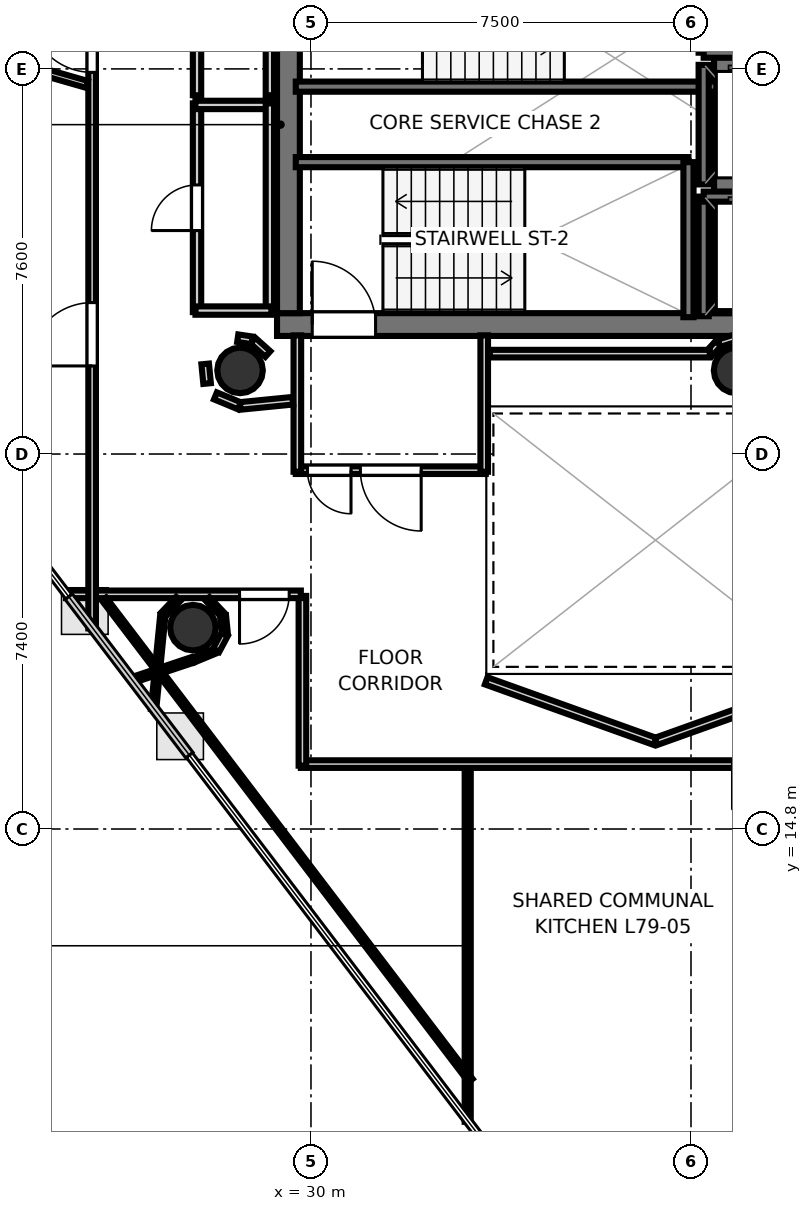
"""IFC4 building model, lengths in metres.
Left out: names, types, materials, properties, quantities, classifications, styles, units other than length and angle.
Written with IfcOpenShell. Run it as: python <this file> out.ifc"""

import sys

from ifc_helpers import new_model, si_unit, direction, frame, frame_2d, origin, origin_2d, place, context, subcontext, project, spatial, rectangle, hollow_circle, extrude, element, fill, save


model = new_model("IFC4")
c1 = context("Model", 3, precision=1e-05, world=origin(), true_north=direction((0.0, 1.0)))
c2 = subcontext(c1, "Body", "Model", "MODEL_VIEW")
j1 = project(units=[si_unit("LENGTHUNIT", "METRE"), si_unit("PLANEANGLEUNIT", "RADIAN")], contexts=[c1])
p1 = place(None, origin())
s1 = spatial("IfcSite", under=j1, at=p1, CompositionType="ELEMENT")
p2 = place(p1, origin())
s2 = spatial("IfcBuilding", under=s1, at=p2, CompositionType="ELEMENT")
p3 = place(p2, frame((0.0, 0.0, 306.5)))
s3 = spatial("IfcBuildingStorey", under=s2, at=p3, CompositionType="ELEMENT", Elevation=306.5)
p4 = place(p3, frame((29.33, 24.755, 0.0), z_axis=(0.0, 0.0, 1.0), x_axis=(1.0, 0.0, 0.0)))
e1 = element("IfcWall", 1, at=p4, inside=s3, PredefinedType="SHEAR", context=c2, shape_type="SweptSolid", body=[
    extrude(rectangle(XDim=10.52, YDim=0.45, at=frame_2d((5.26, 0.0))), origin(), (0.0, 0.0, 1.0), 3.52),
])
p5 = place(p4, frame((0.695, 0.0, 0.0)))
e2 = element("IfcOpeningElement", 2, at=p5, cuts=e1, PredefinedType="OPENING", context=c2, shape_type="SweptSolid", body=[
    extrude(rectangle(XDim=1.25, YDim=2.15, at=frame_2d((0.625, 1.075))), frame((0.0, 0.235, 0.0), z_axis=(0.0, -1.0, 0.0), x_axis=(1.0, 0.0, 0.0)), (0.0, 0.0, 1.0), 0.47),
])
for number, where, z_axis, x_axis in (
    (3, (29.555, 24.98, 0.0), (0.0, 0.0, 1.0), (0.0, 1.0, 0.0)),
    (4, (38.18, 24.98, 0.0), (0.0, 0.0, 1.0), (0.0, 1.0, 0.0)),
):
    element("IfcWall", number, at=place(p3, frame(where, z_axis=z_axis, x_axis=x_axis)), inside=s3, PredefinedType="SHEAR", context=c2, shape_type="SweptSolid", body=[
        extrude(rectangle(XDim=7.44, YDim=0.45, at=frame_2d((3.72, 0.0))), origin(), (0.0, 0.0, 1.0), 3.52),
    ])
for number, where, z_axis, x_axis in (
    (5, (28.6, 23.85, 0.0), (0.0, 0.0, 1.0), (1.0, 0.0, 0.0)),
    (6, (38.4, 23.85, 0.0), (0.0, 0.0, 1.0), (1.0, 0.0, 0.0)),
    (7, (27.67, 18.774, 0.0), (0.0, 0.0, 1.0), (1.0, 0.0, 0.0)),
):
    element("IfcColumn", number, at=place(p3, frame(where, z_axis=z_axis, x_axis=x_axis)), inside=s3, PredefinedType="COLUMN", context=c2, shape_type="SweptSolid", body=[
        extrude(hollow_circle(Radius=0.45, WallThickness=0.025, at=origin_2d()), origin(), (0.0, 0.0, 1.0), 3.7),
    ])
p6 = place(p3, frame((29.7, 29.45, 0.0), z_axis=(0.0, 0.0, 1.0), x_axis=(1.0, 0.0, 0.0)))
e8 = element("IfcWall", 8, at=p6, inside=s3, PredefinedType="SOLIDWALL", context=c2, shape_type="SweptSolid", body=[
    extrude(rectangle(XDim=8.3, YDim=0.2, at=frame_2d((4.15, 0.0))), origin(), (0.0, 0.0, 1.0), 3.52),
])
p7 = place(p3, frame((29.7, 27.96, 0.0), z_axis=(0.0, 0.0, 1.0), x_axis=(1.0, 0.0, 0.0)))
e9 = element("IfcWall", 9, at=p7, inside=s3, PredefinedType="SOLIDWALL", context=c2, shape_type="SweptSolid", body=[
    extrude(rectangle(XDim=7.75, YDim=0.2, at=frame_2d((3.875, 0.0))), origin(), (0.0, 0.0, 1.0), 3.52),
])
p8 = place(p3, frame((37.45, 24.9, 0.0), z_axis=(0.0, 0.0, 1.0), x_axis=(0.0, 1.0, 0.0)))
e10 = element("IfcWall", 10, at=p8, inside=s3, PredefinedType="SOLIDWALL", context=c2, shape_type="SweptSolid", body=[
    extrude(rectangle(XDim=3.06, YDim=0.2, at=frame_2d((1.53, 0.0))), origin(), (0.0, 0.0, 1.0), 3.52),
])
p9 = place(p3, frame((37.75, 30.12, 0.0), z_axis=(0.0, 0.0, 1.0), x_axis=(1.0, 0.0, 0.0)))
e11 = element("IfcWall", 11, at=p9, inside=s3, PredefinedType="SOLIDWALL", context=c2, shape_type="SweptSolid", body=[
    extrude(rectangle(XDim=2.1, YDim=0.2, at=frame_2d((1.05, 0.0))), origin(), (0.0, 0.0, 1.0), 3.52),
])
p10 = place(p3, frame((37.75, 24.92, 0.0), z_axis=(0.0, 0.0, 1.0), x_axis=(0.0, 1.0, 0.0)))
e12 = element("IfcWall", 12, at=p10, inside=s3, PredefinedType="SOLIDWALL", context=c2, shape_type="SweptSolid", body=[
    extrude(rectangle(XDim=2.36, YDim=0.2, at=frame_2d((1.18, 0.0))), origin(), (0.0, 0.0, 1.0), 3.52),
])
p11 = place(p3, frame((37.75, 27.28, 0.0), z_axis=(0.0, 0.0, 1.0), x_axis=(1.0, 0.0, 0.0)))
e13 = element("IfcWall", 13, at=p11, inside=s3, PredefinedType="SOLIDWALL", context=c2, shape_type="SweptSolid", body=[
    extrude(rectangle(XDim=2.1, YDim=0.2, at=frame_2d((1.05, 0.0))), origin(), (0.0, 0.0, 1.0), 3.52),
])
p12 = place(p3, frame((37.75, 27.52, 0.0), z_axis=(0.0, 0.0, 1.0), x_axis=(0.0, 1.0, 0.0)))
e14 = element("IfcWall", 14, at=p12, inside=s3, PredefinedType="SOLIDWALL", context=c2, shape_type="SweptSolid", body=[
    extrude(rectangle(XDim=2.36, YDim=0.2, at=frame_2d((1.18, 0.0))), origin(), (0.0, 0.0, 1.0), 3.52),
])
p13 = place(p3, frame((33.45, 21.881, 0.0), z_axis=(0.0, 0.0, 1.0), x_axis=(-1.0, 0.0, 0.0)))
e15 = element("IfcWall", 15, at=p13, inside=s3, PredefinedType="PARTITIONING", context=c2, shape_type="SweptSolid", body=[
    extrude(rectangle(XDim=3.75, YDim=0.15, at=frame_2d((1.875, 0.0))), origin(), (0.0, 0.0, 1.0), 2.84),
])
p14 = place(p13, frame((1.275, 0.0, 0.0)))
e16 = element("IfcOpeningElement", 16, at=p14, cuts=e15, PredefinedType="OPENING", context=c2, shape_type="SweptSolid", body=[
    extrude(rectangle(XDim=1.2, YDim=2.15, at=frame_2d((0.6, 1.075))), frame((0.0, 0.085, 0.0), z_axis=(0.0, -1.0, 0.0), x_axis=(1.0, 0.0, 0.0)), (0.0, 0.0, 1.0), 0.17),
])
p15 = place(p13, frame((2.66, 0.0, 0.0)))
e17 = element("IfcOpeningElement", 17, at=p15, cuts=e15, PredefinedType="OPENING", context=c2, shape_type="SweptSolid", body=[
    extrude(rectangle(XDim=0.86, YDim=2.05, at=frame_2d((0.43, 1.025))), frame((0.0, 0.085, 0.0), z_axis=(0.0, -1.0, 0.0), x_axis=(1.0, 0.0, 0.0)), (0.0, 0.0, 1.0), 0.17),
])
for number, where, z_axis, x_axis in (
    (18, (29.731, 21.85, 0.0), (0.0, 0.0, 1.0), (0.0, 1.0, 0.0)),
    (19, (33.419, 24.542, 0.0), (0.0, 0.0, 1.0), (0.0, -1.0, 0.0)),
):
    element("IfcWall", number, at=place(p3, frame(where, z_axis=z_axis, x_axis=x_axis)), inside=s3, PredefinedType="PARTITIONING", context=c2, shape_type="SweptSolid", body=[
        extrude(rectangle(XDim=2.692, YDim=0.15, at=frame_2d((1.346, 0.0))), origin(), (0.0, 0.0, 1.0), 2.84),
    ])
p16 = place(p3, frame((27.751, 25.0, 0.0), z_axis=(0.0, 0.0, 1.0), x_axis=(0.0, 1.0, 0.0)))
e20 = element("IfcWall", 20, at=p16, inside=s3, PredefinedType="PLUMBINGWALL", context=c2, shape_type="SweptSolid", body=[
    extrude(rectangle(XDim=4.12, YDim=0.165, at=frame_2d((2.06, 0.0))), origin(), (0.0, 0.0, 1.0), 2.84),
])
p17 = place(p16, frame((1.61, 0.0, 0.0)))
e21 = element("IfcOpeningElement", 21, at=p17, cuts=e20, PredefinedType="OPENING", context=c2, shape_type="SweptSolid", body=[
    extrude(rectangle(XDim=0.9, YDim=2.1, at=frame_2d((0.45, 1.05))), frame((0.0, 0.093, 0.0), z_axis=(0.0, -1.0, 0.0), x_axis=(1.0, 0.0, 0.0)), (0.0, 0.0, 1.0), 0.185),
])
p18 = place(p3, frame((27.72, 29.089, 0.0), z_axis=(0.0, 0.0, 1.0), x_axis=(1.0, 0.0, 0.0)))
e22 = element("IfcWall", 22, at=p18, inside=s3, PredefinedType="PLUMBINGWALL", context=c2, shape_type="SweptSolid", body=[
    extrude(rectangle(XDim=1.5, YDim=0.165, at=frame_2d((0.75, 0.0))), origin(), (0.0, 0.0, 1.0), 2.84),
])
p19 = place(p3, frame((29.189, 29.12, 0.0), z_axis=(0.0, 0.0, 1.0), x_axis=(0.0, -1.0, 0.0)))
e23 = element("IfcWall", 23, at=p19, inside=s3, PredefinedType="PLUMBINGWALL", context=c2, shape_type="SweptSolid", body=[
    extrude(rectangle(XDim=4.12, YDim=0.165, at=frame_2d((2.06, 0.0))), origin(), (0.0, 0.0, 1.0), 2.84),
])
p20 = place(p3, frame((29.22, 25.031, 0.0), z_axis=(0.0, 0.0, 1.0), x_axis=(-1.0, 0.0, 0.0)))
e24 = element("IfcWall", 24, at=p20, inside=s3, PredefinedType="PLUMBINGWALL", context=c2, shape_type="SweptSolid", body=[
    extrude(rectangle(XDim=1.5, YDim=0.165, at=frame_2d((0.75, 0.0))), origin(), (0.0, 0.0, 1.0), 2.84),
])
p21 = place(p3, frame((27.751, 29.28, 0.0), z_axis=(0.0, 0.0, 1.0), x_axis=(0.0, 1.0, 0.0)))
e25 = element("IfcWall", 25, at=p21, inside=s3, PredefinedType="PLUMBINGWALL", context=c2, shape_type="SweptSolid", body=[
    extrude(rectangle(XDim=3.17, YDim=0.165, at=frame_2d((1.585, 0.0))), origin(), (0.0, 0.0, 1.0), 2.84),
])
p22 = place(p21, frame((1.155, 0.0, 0.0)))
e26 = element("IfcOpeningElement", 26, at=p22, cuts=e25, PredefinedType="OPENING", context=c2, shape_type="SweptSolid", body=[
    extrude(rectangle(XDim=0.86, YDim=2.05, at=frame_2d((0.43, 1.025))), frame((0.0, 0.093, 0.0), z_axis=(0.0, -1.0, 0.0), x_axis=(1.0, 0.0, 0.0)), (0.0, 0.0, 1.0), 0.185),
])
p23 = place(p3, frame((29.189, 32.45, 0.0), z_axis=(0.0, 0.0, 1.0), x_axis=(0.0, -1.0, 0.0)))
e27 = element("IfcWall", 27, at=p23, inside=s3, PredefinedType="PLUMBINGWALL", context=c2, shape_type="SweptSolid", body=[
    extrude(rectangle(XDim=3.17, YDim=0.165, at=frame_2d((1.585, 0.0))), origin(), (0.0, 0.0, 1.0), 2.84),
])
p24 = place(p3, frame((38.391, 24.49, 0.0), z_axis=(0.0, 0.0, 1.0), x_axis=(-0.957007018611, -0.290064762301, 0.0)))
e28 = element("IfcWall", 28, at=p24, inside=s3, PredefinedType="PARTITIONING", context=c2, shape_type="SweptSolid", body=[
    extrude(rectangle(XDim=0.354, YDim=0.15, at=frame_2d((0.177, 0.0))), origin(), (0.0, 0.0, 1.0), 2.84),
])
p25 = place(p3, frame((38.038, 24.378, 0.0), z_axis=(0.0, 0.0, 1.0), x_axis=(-0.673658387955, -0.739042878551, 0.0)))
e29 = element("IfcWall", 29, at=p25, inside=s3, PredefinedType="PARTITIONING", context=c2, shape_type="SweptSolid", body=[
    extrude(rectangle(XDim=0.246, YDim=0.15, at=frame_2d((0.123, 0.0))), origin(), (0.0, 0.0, 1.0), 2.84),
])
p26 = place(p3, frame((37.872, 24.181, 0.0), z_axis=(0.0, 0.0, 1.0), x_axis=(-1.0, 0.0, 0.0)))
e30 = element("IfcWall", 30, at=p26, inside=s3, PredefinedType="PARTITIONING", context=c2, shape_type="SweptSolid", body=[
    extrude(rectangle(XDim=4.342, YDim=0.15, at=frame_2d((2.171, 0.0))), origin(), (0.0, 0.0, 1.0), 2.84),
])
p27 = place(p3, frame((29.149, 24.173, 0.0), z_axis=(0.0, 0.0, 1.0), x_axis=(-0.745225165416, 0.666812906917, 0.0)))
e31 = element("IfcWall", 31, at=p27, inside=s3, PredefinedType="PARTITIONING", context=c2, shape_type="SweptSolid", body=[
    extrude(rectangle(XDim=0.396, YDim=0.15, at=frame_2d((0.198, 0.0))), origin(), (0.0, 0.0, 1.0), 2.84),
])
p28 = place(p3, frame((28.838, 24.444, 0.0), z_axis=(0.0, 0.0, 1.0), x_axis=(-0.989449148305, 0.144880581578, 0.0)))
e32 = element("IfcWall", 32, at=p28, inside=s3, PredefinedType="PARTITIONING", context=c2, shape_type="SweptSolid", body=[
    extrude(rectangle(XDim=0.286, YDim=0.15, at=frame_2d((0.143, 0.0))), origin(), (0.0, 0.0, 1.0), 2.84),
])
p29 = place(p3, frame((27.912, 23.978, 0.0), z_axis=(0.0, 0.0, 1.0), x_axis=(0.097888269922, -0.995197410875, 0.0)))
e33 = element("IfcWall", 33, at=p29, inside=s3, PredefinedType="PARTITIONING", context=c2, shape_type="SweptSolid", body=[
    extrude(rectangle(XDim=0.389, YDim=0.15, at=frame_2d((0.195, 0.0))), origin(), (0.0, 0.0, 1.0), 2.84),
])
p30 = place(p3, frame((28.115, 23.348, 0.0), z_axis=(0.0, 0.0, 1.0), x_axis=(0.923807847969, -0.382856448334, 0.0)))
e34 = element("IfcWall", 34, at=p30, inside=s3, PredefinedType="PARTITIONING", context=c2, shape_type="SweptSolid", body=[
    extrude(rectangle(XDim=0.513, YDim=0.15, at=frame_2d((0.256, 0.0))), origin(), (0.0, 0.0, 1.0), 2.84),
])
p31 = place(p3, frame((28.603, 23.149, 0.0), z_axis=(0.0, 0.0, 1.0), x_axis=(0.995179827095, 0.098066873836, 0.0)))
e35 = element("IfcWall", 35, at=p31, inside=s3, PredefinedType="PARTITIONING", context=c2, shape_type="SweptSolid", body=[
    extrude(rectangle(XDim=1.043, YDim=0.15, at=frame_2d((0.521, 0.0))), origin(), (0.0, 0.0, 1.0), 2.84),
])
p32 = place(p3, frame((33.458, 17.724, 0.0), z_axis=(0.0, 0.0, 1.0), x_axis=(0.94128854789, -0.337603124408, 0.0)))
e36 = element("IfcWall", 36, at=p32, inside=s3, PredefinedType="PARTITIONING", context=c2, shape_type="SweptSolid", body=[
    extrude(rectangle(XDim=3.54, YDim=0.15, at=frame_2d((1.77, 0.0))), origin(), (0.0, 0.0, 1.0), 2.84),
])
p33 = place(p3, frame((36.81, 16.529, 0.0), z_axis=(0.0, 0.0, 1.0), x_axis=(0.941548344365, 0.33687789364, 0.0)))
e37 = element("IfcWall", 37, at=p33, inside=s3, PredefinedType="PARTITIONING", context=c2, shape_type="SweptSolid", body=[
    extrude(rectangle(XDim=3.513, YDim=0.15, at=frame_2d((1.756, 0.0))), origin(), (0.0, 0.0, 1.0), 2.84),
])
p34 = place(p3, frame((42.65, 16.081, 0.0), z_axis=(0.0, 0.0, 1.0), x_axis=(-1.0, 0.0, 0.0)))
e38 = element("IfcWall", 38, at=p34, inside=s3, PredefinedType="PARTITIONING", context=c2, shape_type="SweptSolid", body=[
    extrude(rectangle(XDim=12.85, YDim=0.15, at=frame_2d((6.425, 0.0))), origin(), (0.0, 0.0, 1.0), 2.84),
])
p35 = place(p34, frame((3.431, 0.0, 0.0)))
e39 = element("IfcOpeningElement", 39, at=p35, cuts=e38, PredefinedType="OPENING", context=c2, shape_type="SweptSolid", body=[
    extrude(rectangle(XDim=0.9, YDim=2.1, at=frame_2d((0.45, 1.05))), frame((0.0, 0.085, 0.0), z_axis=(0.0, -1.0, 0.0), x_axis=(1.0, 0.0, 0.0)), (0.0, 0.0, 1.0), 0.17),
])
p36 = place(p3, frame((29.831, 16.05, 0.0), z_axis=(0.0, 0.0, 1.0), x_axis=(0.0, 1.0, 0.0)))
e40 = element("IfcWall", 40, at=p36, inside=s3, PredefinedType="PARTITIONING", context=c2, shape_type="SweptSolid", body=[
    extrude(rectangle(XDim=3.35, YDim=0.15, at=frame_2d((1.675, 0.0))), origin(), (0.0, 0.0, 1.0), 2.84),
])
p37 = place(p3, frame((29.8, 19.431, 0.0), z_axis=(0.0, 0.0, 1.0), x_axis=(-1.0, 0.0, 0.0)))
e41 = element("IfcWall", 41, at=p37, inside=s3, PredefinedType="PARTITIONING", context=c2, shape_type="SweptSolid", body=[
    extrude(rectangle(XDim=4.635, YDim=0.15, at=frame_2d((2.318, 0.0))), origin(), (0.0, 0.0, 1.0), 2.84),
])
p38 = place(p37, frame((0.23, 0.0, 0.0)))
e42 = element("IfcOpeningElement", 42, at=p38, cuts=e41, PredefinedType="OPENING", context=c2, shape_type="SweptSolid", body=[
    extrude(rectangle(XDim=0.98, YDim=2.1, at=frame_2d((0.49, 1.05))), frame((0.0, 0.085, 0.0), z_axis=(0.0, -1.0, 0.0), x_axis=(1.0, 0.0, 0.0)), (0.0, 0.0, 1.0), 0.17),
])
p39 = place(p3, frame((25.681, 18.759, 0.0), z_axis=(0.0, 0.0, 1.0), x_axis=(0.0, 1.0, 0.0)))
e43 = element("IfcWall", 43, at=p39, inside=s3, PredefinedType="PARTITIONING", context=c2, shape_type="SweptSolid", body=[
    extrude(rectangle(XDim=13.791, YDim=0.15, at=frame_2d((6.896, 0.0))), origin(), (0.0, 0.0, 1.0), 2.84),
])
p40 = place(p39, frame((10.973, 0.0, 0.0)))
e44 = element("IfcOpeningElement", 44, at=p40, cuts=e43, PredefinedType="OPENING", context=c2, shape_type="SweptSolid", body=[
    extrude(rectangle(XDim=1.25, YDim=2.2, at=frame_2d((0.625, 1.1))), frame((0.0, 0.085, 0.0), z_axis=(0.0, -1.0, 0.0), x_axis=(1.0, 0.0, 0.0)), (0.0, 0.0, 1.0), 0.17),
])
p41 = place(p39, frame((5.179, 0.0, 0.0)))
e45 = element("IfcOpeningElement", 45, at=p41, cuts=e43, PredefinedType="OPENING", context=c2, shape_type="SweptSolid", body=[
    extrude(rectangle(XDim=1.25, YDim=2.2, at=frame_2d((0.625, 1.1))), frame((0.0, 0.085, 0.0), z_axis=(0.0, -1.0, 0.0), x_axis=(1.0, 0.0, 0.0)), (0.0, 0.0, 1.0), 0.17),
])
p42 = place(p3, frame((33.093, 15.97, 0.0), z_axis=(0.0, 0.0, 1.0), x_axis=(0.0, -1.0, 0.0)))
e46 = element("IfcWall", 46, at=p42, inside=s3, PredefinedType="PARTITIONING", context=c2, shape_type="SweptSolid", body=[
    extrude(rectangle(XDim=6.948, YDim=0.12, at=frame_2d((3.474, 0.0))), origin(), (0.0, 0.0, 1.0), 2.84),
])
p43 = place(p3, frame((33.149, 9.837, 0.0), z_axis=(0.0, 0.0, 1.0), x_axis=(-0.605712382607, 0.795683674306, 0.0)))
e47 = element("IfcWall", 47, at=p43, inside=s3, PredefinedType="PARTITIONING", context=c2, shape_type="SweptSolid", body=[
    extrude(rectangle(XDim=11.942, YDim=0.105, at=frame_2d((5.971, 0.0))), origin(), (0.0, 0.0, 1.0), 2.84),
])
p44 = place(p3, frame((27.381, 19.341, 0.0), z_axis=(0.0, 0.0, 1.0), x_axis=(-0.689047004353, -0.724716652073, 0.0)))
e48 = element("IfcWall", 48, at=p44, inside=s3, PredefinedType="PARTITIONING", context=c2, shape_type="SweptSolid", body=[
    extrude(rectangle(XDim=0.431, YDim=0.12, at=frame_2d((0.216, 0.0))), origin(), (0.0, 0.0, 1.0), 2.84),
])
p45 = place(p3, frame((27.076, 19.01, 0.0), z_axis=(0.0, 0.0, 1.0), x_axis=(-0.0979929155, -0.995187112312, 0.0)))
e49 = element("IfcWall", 49, at=p45, inside=s3, PredefinedType="PARTITIONING", context=c2, shape_type="SweptSolid", body=[
    extrude(rectangle(XDim=1.856, YDim=0.105, at=frame_2d((0.928, 0.0))), origin(), (0.0, 0.0, 1.0), 2.84),
])
p46 = place(p3, frame((26.472, 17.74, 0.0), z_axis=(0.0, 0.0, 1.0), x_axis=(0.948526981909, 0.316696328665, 0.0)))
e50 = element("IfcWall", 50, at=p46, inside=s3, PredefinedType="PARTITIONING", context=c2, shape_type="SweptSolid", body=[
    extrude(rectangle(XDim=1.25, YDim=0.12, at=frame_2d((0.625, 0.0))), origin(), (0.0, 0.0, 1.0), 2.84),
])
p47 = place(p3, frame((27.682, 18.135, 0.0), z_axis=(0.0, 0.0, 1.0), x_axis=(0.924048683901, 0.382274809242, 0.0)))
e51 = element("IfcWall", 51, at=p47, inside=s3, PredefinedType="PARTITIONING", context=c2, shape_type="SweptSolid", body=[
    extrude(rectangle(XDim=0.467, YDim=0.105, at=frame_2d((0.233, 0.0))), origin(), (0.0, 0.0, 1.0), 2.84),
])
p48 = place(p3, frame((28.129, 18.328, 0.0), z_axis=(0.0, 0.0, 1.0), x_axis=(0.471589913721, 0.881817981942, 0.0)))
e52 = element("IfcWall", 52, at=p48, inside=s3, PredefinedType="PARTITIONING", context=c2, shape_type="SweptSolid", body=[
    extrude(rectangle(XDim=0.354, YDim=0.14, at=frame_2d((0.177, 0.0))), origin(), (0.0, 0.0, 1.0), 2.84),
])
p49 = place(p3, frame((28.299, 18.658, 0.0), z_axis=(0.0, 0.0, 1.0), x_axis=(-0.097865889817, 0.995199611942, 0.0)))
e53 = element("IfcWall", 53, at=p49, inside=s3, PredefinedType="PARTITIONING", context=c2, shape_type="SweptSolid", body=[
    extrude(rectangle(XDim=0.354, YDim=0.12, at=frame_2d((0.177, 0.0))), origin(), (0.0, 0.0, 1.0), 2.84),
])
p50 = place(p3, frame((28.256, 19.029, 0.0), z_axis=(0.0, 0.0, 1.0), x_axis=(-0.689344198757, 0.724433969137, 0.0)))
e54 = element("IfcWall", 54, at=p50, inside=s3, PredefinedType="PARTITIONING", context=c2, shape_type="SweptSolid", body=[
    extrude(rectangle(XDim=0.431, YDim=0.105, at=frame_2d((0.216, 0.0))), origin(), (0.0, 0.0, 1.0), 2.84),
])
p51 = place(p3, frame((25.579, 29.494, 0.0), z_axis=(0.0, 0.0, 1.0), x_axis=(-0.961265309794, 0.275624752494, 0.0)))
e55 = element("IfcWall", 55, at=p51, inside=s3, PredefinedType="PARTITIONING", context=c2, shape_type="SweptSolid", body=[
    extrude(rectangle(XDim=6.743, YDim=0.14, at=frame_2d((3.372, 0.0))), origin(), (0.0, 0.0, 1.0), 2.84),
])
p52 = place(p5, origin())
e56 = element("IfcDoor", 56, at=p52, inside=s3, OperationType="SINGLE_SWING_LEFT", PredefinedType="DOOR", context=c2, shape_type="SweptSolid", body=[
    extrude(rectangle(XDim=1.25, YDim=2.15, at=frame_2d((0.625, 1.075))), frame((0.0, 0.025, 0.0), z_axis=(0.0, -1.0, 0.0), x_axis=(1.0, 0.0, 0.0)), (0.0, 0.0, 1.0), 0.05),
])
fill(e2, e56)
p53 = place(p14, origin())
e57 = element("IfcDoor", 57, at=p53, inside=s3, OperationType="SINGLE_SWING_LEFT", PredefinedType="DOOR", context=c2, shape_type="SweptSolid", body=[
    extrude(rectangle(XDim=1.2, YDim=2.15, at=frame_2d((0.6, 1.075))), frame((0.0, 0.025, 0.0), z_axis=(0.0, -1.0, 0.0), x_axis=(1.0, 0.0, 0.0)), (0.0, 0.0, 1.0), 0.05),
])
fill(e16, e57)
p54 = place(p17, origin())
e58 = element("IfcDoor", 58, at=p54, inside=s3, OperationType="SINGLE_SWING_LEFT", PredefinedType="DOOR", context=c2, shape_type="SweptSolid", body=[
    extrude(rectangle(XDim=0.9, YDim=2.1, at=frame_2d((0.45, 1.05))), frame((0.0, 0.025, 0.0), z_axis=(0.0, -1.0, 0.0), x_axis=(1.0, 0.0, 0.0)), (0.0, 0.0, 1.0), 0.05),
])
fill(e21, e58)
p55 = place(p15, origin())
e59 = element("IfcDoor", 59, at=p55, inside=s3, OperationType="SINGLE_SWING_LEFT", PredefinedType="DOOR", context=c2, shape_type="SweptSolid", body=[
    extrude(rectangle(XDim=0.86, YDim=2.05, at=frame_2d((0.43, 1.025))), frame((0.0, 0.025, 0.0), z_axis=(0.0, -1.0, 0.0), x_axis=(1.0, 0.0, 0.0)), (0.0, 0.0, 1.0), 0.05),
])
fill(e17, e59)
p56 = place(p38, origin())
e60 = element("IfcDoor", 60, at=p56, inside=s3, OperationType="SINGLE_SWING_RIGHT", PredefinedType="DOOR", context=c2, shape_type="SweptSolid", body=[
    extrude(rectangle(XDim=0.98, YDim=2.1, at=frame_2d((0.49, 1.05))), frame((0.0, 0.025, 0.0), z_axis=(0.0, -1.0, 0.0), x_axis=(1.0, 0.0, 0.0)), (0.0, 0.0, 1.0), 0.05),
])
fill(e42, e60)
p57 = place(p40, origin())
e61 = element("IfcDoor", 61, at=p57, inside=s3, OperationType="SINGLE_SWING_RIGHT", PredefinedType="DOOR", context=c2, shape_type="SweptSolid", body=[
    extrude(rectangle(XDim=1.25, YDim=2.2, at=frame_2d((0.625, 1.1))), frame((0.0, 0.025, 0.0), z_axis=(0.0, -1.0, 0.0), x_axis=(1.0, 0.0, 0.0)), (0.0, 0.0, 1.0), 0.05),
])
fill(e44, e61)
p58 = place(p41, origin())
e62 = element("IfcDoor", 62, at=p58, inside=s3, OperationType="SINGLE_SWING_LEFT", PredefinedType="DOOR", context=c2, shape_type="SweptSolid", body=[
    extrude(rectangle(XDim=1.25, YDim=2.2, at=frame_2d((0.625, 1.1))), frame((0.0, 0.025, 0.0), z_axis=(0.0, -1.0, 0.0), x_axis=(1.0, 0.0, 0.0)), (0.0, 0.0, 1.0), 0.05),
])
fill(e45, e62)
p59 = place(p35, origin())
e63 = element("IfcDoor", 63, at=p59, inside=s3, OperationType="SINGLE_SWING_RIGHT", PredefinedType="DOOR", context=c2, shape_type="SweptSolid", body=[
    extrude(rectangle(XDim=0.9, YDim=2.1, at=frame_2d((0.45, 1.05))), frame((0.0, 0.025, 0.0), z_axis=(0.0, -1.0, 0.0), x_axis=(1.0, 0.0, 0.0)), (0.0, 0.0, 1.0), 0.05),
])
fill(e39, e63)
save(model, sys.argv[1])
